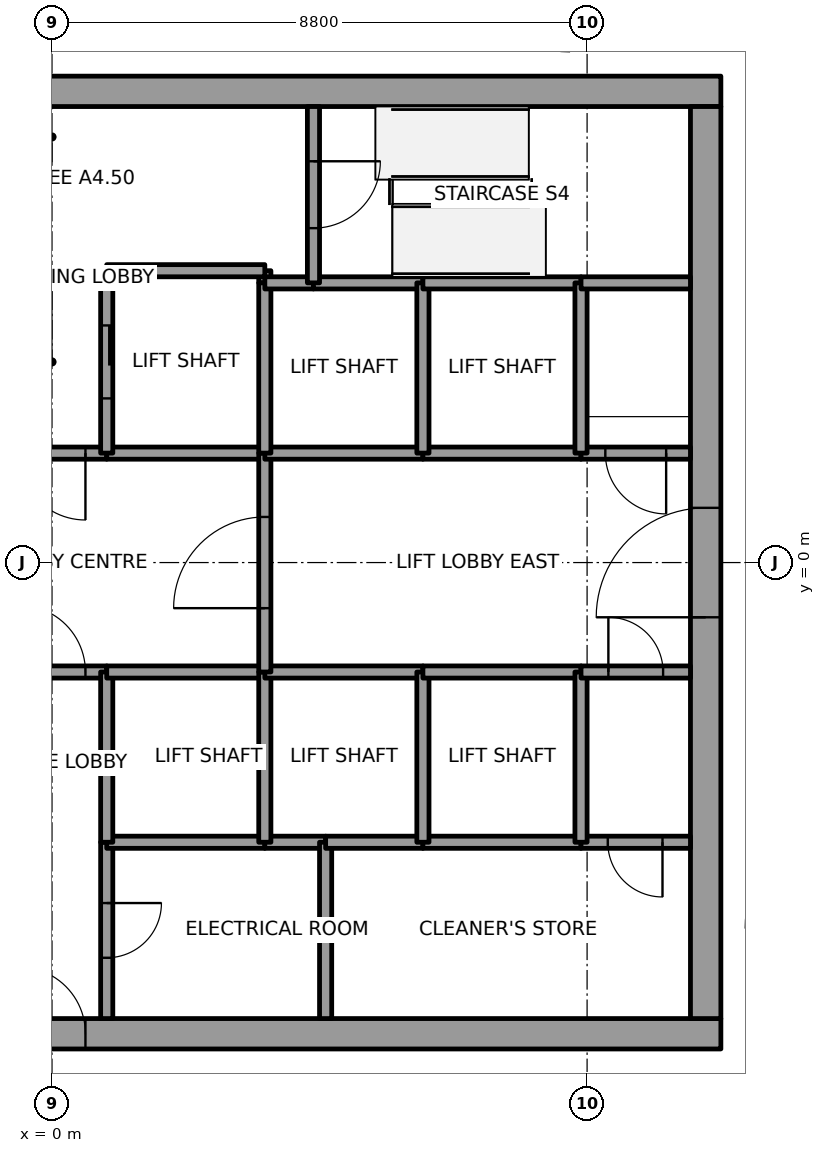
"""IFC4 building model, lengths in metres.
Left out: names, types, materials, properties, quantities, classifications, styles, units other than length and angle.
Written with IfcOpenShell. Run it as: python <this file> out.ifc"""

import sys

from ifc_helpers import new_model, si_unit, direction, frame, frame_2d, origin, place, context, subcontext, project, spatial, rectangle, extrude, element, fill, save


model = new_model("IFC4")
c1 = context("Model", 3, precision=1e-05, world=origin(), true_north=direction((0.0, 1.0)))
c2 = subcontext(c1, "Body", "Model", "MODEL_VIEW")
j1 = project(units=[si_unit("LENGTHUNIT", "METRE"), si_unit("PLANEANGLEUNIT", "RADIAN")], contexts=[c1])
p1 = place(None, origin())
s1 = spatial("IfcSite", under=j1, at=p1, CompositionType="ELEMENT")
p2 = place(p1, origin())
s2 = spatial("IfcBuilding", under=s1, at=p2, CompositionType="ELEMENT")
p3 = place(p2, frame((0.0, 0.0, 213.8)))
s3 = spatial("IfcBuildingStorey", under=s2, at=p3, CompositionType="ELEMENT", Elevation=213.8)
p4 = place(p3, frame((-11.0, -7.75, 0.0), z_axis=(0.0, 0.0, 1.0), x_axis=(1.0, 0.0, 0.0)))
e1 = element("IfcWall", 1, at=p4, inside=s3, PredefinedType="SHEAR", context=c2, shape_type="SweptSolid", body=[
    extrude(rectangle(XDim=22.0, YDim=0.5, at=frame_2d((11.0, 0.0))), origin(), (0.0, 0.0, 1.0), 6.0),
])
p5 = place(p4, frame((10.45, 0.0, 0.0)))
e2 = element("IfcOpeningElement", 2, at=p5, cuts=e1, PredefinedType="OPENING", context=c2, shape_type="SweptSolid", body=[
    extrude(rectangle(XDim=1.1, YDim=2.1, at=frame_2d((0.55, 1.05))), frame((0.0, 0.25, 0.0), z_axis=(0.0, -1.0, 0.0), x_axis=(1.0, 0.0, 0.0)), (0.0, 0.0, 1.0), 0.5),
])
p6 = place(p3, frame((-11.0, 7.75, 0.0), z_axis=(0.0, 0.0, 1.0), x_axis=(1.0, 0.0, 0.0)))
e3 = element("IfcWall", 3, at=p6, inside=s3, PredefinedType="SHEAR", context=c2, shape_type="SweptSolid", body=[
    extrude(rectangle(XDim=22.0, YDim=0.5, at=frame_2d((11.0, 0.0))), origin(), (0.0, 0.0, 1.0), 6.0),
])
p7 = place(p6, frame((8.55, 0.0, 0.0)))
e4 = element("IfcOpeningElement", 4, at=p7, cuts=e3, PredefinedType="OPENING", context=c2, shape_type="SweptSolid", body=[
    extrude(rectangle(XDim=1.1, YDim=2.1, at=frame_2d((0.55, 1.05))), frame((0.0, 0.25, 0.0), z_axis=(0.0, -1.0, 0.0), x_axis=(1.0, 0.0, 0.0)), (0.0, 0.0, 1.0), 0.5),
])
p8 = place(p3, frame((10.75, -7.5, 0.0), z_axis=(0.0, 0.0, 1.0), x_axis=(0.0, 1.0, 0.0)))
e5 = element("IfcWall", 5, at=p8, inside=s3, PredefinedType="SHEAR", context=c2, shape_type="SweptSolid", body=[
    extrude(rectangle(XDim=15.0, YDim=0.5, at=frame_2d((7.5, 0.0))), origin(), (0.0, 0.0, 1.0), 6.0),
])
p9 = place(p8, frame((6.6, 0.0, 0.0)))
e6 = element("IfcOpeningElement", 6, at=p9, cuts=e5, PredefinedType="OPENING", context=c2, shape_type="SweptSolid", body=[
    extrude(rectangle(XDim=1.8, YDim=2.1, at=frame_2d((0.9, 1.05))), frame((0.0, 0.25, 0.0), z_axis=(0.0, -1.0, 0.0), x_axis=(1.0, 0.0, 0.0)), (0.0, 0.0, 1.0), 0.5),
])
p10 = place(p3, frame((-0.9, -1.8, 0.0), z_axis=(0.0, 0.0, 1.0), x_axis=(1.0, 0.0, 0.0)))
e7 = element("IfcWall", 7, at=p10, inside=s3, PredefinedType="SOLIDWALL", context=c2, shape_type="SweptSolid", body=[
    extrude(rectangle(XDim=1.8, YDim=0.2, at=frame_2d((0.9, 0.0))), origin(), (0.0, 0.0, 1.0), 5.85),
])
p11 = place(p10, frame((0.35, 0.0, 0.0)))
e8 = element("IfcOpeningElement", 8, at=p11, cuts=e7, PredefinedType="OPENING", context=c2, shape_type="SweptSolid", body=[
    extrude(rectangle(XDim=1.1, YDim=2.1, at=frame_2d((0.55, 1.05))), frame((0.0, 0.1, 0.0), z_axis=(0.0, -1.0, 0.0), x_axis=(1.0, 0.0, 0.0)), (0.0, 0.0, 1.0), 0.2),
])
p12 = place(p3, frame((0.9, 1.8, 0.0), z_axis=(0.0, 0.0, 1.0), x_axis=(-1.0, 0.0, 0.0)))
e9 = element("IfcWall", 9, at=p12, inside=s3, PredefinedType="SOLIDWALL", context=c2, shape_type="SweptSolid", body=[
    extrude(rectangle(XDim=1.8, YDim=0.2, at=frame_2d((0.9, 0.0))), origin(), (0.0, 0.0, 1.0), 5.85),
])
p13 = place(p12, frame((0.35, 0.0, 0.0)))
e10 = element("IfcOpeningElement", 10, at=p13, cuts=e9, PredefinedType="OPENING", context=c2, shape_type="SweptSolid", body=[
    extrude(rectangle(XDim=1.1, YDim=2.1, at=frame_2d((0.55, 1.05))), frame((0.0, 0.1, 0.0), z_axis=(0.0, -1.0, 0.0), x_axis=(1.0, 0.0, 0.0)), (0.0, 0.0, 1.0), 0.2),
])
p14 = place(p3, frame((0.9, -4.6, 0.0), z_axis=(0.0, 0.0, 1.0), x_axis=(0.0, -1.0, 0.0)))
e11 = element("IfcWall", 11, at=p14, inside=s3, PredefinedType="SOLIDWALL", context=c2, shape_type="SweptSolid", body=[
    extrude(rectangle(XDim=2.9, YDim=0.2, at=frame_2d((1.45, 0.0))), origin(), (0.0, 0.0, 1.0), 5.85),
])
p15 = place(p14, frame((1.0, 0.0, 0.0)))
e12 = element("IfcOpeningElement", 12, at=p15, cuts=e11, PredefinedType="OPENING", context=c2, shape_type="SweptSolid", body=[
    extrude(rectangle(XDim=0.9, YDim=2.1, at=frame_2d((0.45, 1.05))), frame((0.0, 0.1, 0.0), z_axis=(0.0, -1.0, 0.0), x_axis=(1.0, 0.0, 0.0)), (0.0, 0.0, 1.0), 0.2),
])
p16 = place(p3, frame((3.5, -4.6, 0.0), z_axis=(0.0, 0.0, 1.0), x_axis=(-1.0, 0.0, 0.0)))
e13 = element("IfcWall", 13, at=p16, inside=s3, PredefinedType="SOLIDWALL", context=c2, shape_type="SweptSolid", body=[
    extrude(rectangle(XDim=2.6, YDim=0.2, at=frame_2d((1.3, 0.0))), origin(), (0.0, 0.0, 1.0), 5.85),
])
p17 = place(p3, frame((0.9, -1.8, 0.0), z_axis=(0.0, 0.0, 1.0), x_axis=(0.0, -1.0, 0.0)))
e14 = element("IfcWall", 14, at=p17, inside=s3, PredefinedType="SOLIDWALL", context=c2, shape_type="SweptSolid", body=[
    extrude(rectangle(XDim=2.8, YDim=0.2, at=frame_2d((1.4, 0.0))), origin(), (0.0, 0.0, 1.0), 5.85),
])
for number, where, z_axis, x_axis in (
    (15, (0.9, -1.8, 0.0), (0.0, 0.0, 1.0), (1.0, 0.0, 0.0)),
    (16, (3.5, 1.8, 0.0), (0.0, 0.0, 1.0), (-1.0, 0.0, 0.0)),
):
    element("IfcWall", number, at=place(p3, frame(where, z_axis=z_axis, x_axis=x_axis)), inside=s3, PredefinedType="SOLIDWALL", context=c2, shape_type="SweptSolid", body=[
        extrude(rectangle(XDim=2.6, YDim=0.2, at=frame_2d((1.3, 0.0))), origin(), (0.0, 0.0, 1.0), 5.85),
    ])
p18 = place(p3, frame((3.5, 4.6, 0.0), z_axis=(0.0, 0.0, 1.0), x_axis=(0.0, 1.0, 0.0)))
e17 = element("IfcWall", 17, at=p18, inside=s3, PredefinedType="SOLIDWALL", context=c2, shape_type="SweptSolid", body=[
    extrude(rectangle(XDim=0.2, YDim=0.2, at=frame_2d((0.1, 0.0))), origin(), (0.0, 0.0, 1.0), 5.85),
])
p19 = place(p3, frame((3.5, 4.8, 0.0), z_axis=(0.0, 0.0, 1.0), x_axis=(-1.0, 0.0, 0.0)))
e18 = element("IfcWall", 18, at=p19, inside=s3, PredefinedType="SOLIDWALL", context=c2, shape_type="SweptSolid", body=[
    extrude(rectangle(XDim=2.6, YDim=0.2, at=frame_2d((1.3, 0.0))), origin(), (0.0, 0.0, 1.0), 5.85),
])
p20 = place(p3, frame((0.9, 4.8, 0.0), z_axis=(0.0, 0.0, 1.0), x_axis=(0.0, -1.0, 0.0)))
e19 = element("IfcWall", 19, at=p20, inside=s3, PredefinedType="SOLIDWALL", context=c2, shape_type="SweptSolid", body=[
    extrude(rectangle(XDim=3.0, YDim=0.2, at=frame_2d((1.5, 0.0))), origin(), (0.0, 0.0, 1.0), 5.85),
])
p21 = place(p20, frame((0.9, 0.0, 0.0)))
e20 = element("IfcOpeningElement", 20, at=p21, cuts=e19, PredefinedType="OPENING", context=c2, shape_type="SweptSolid", body=[
    extrude(rectangle(XDim=1.2, YDim=2.1, at=frame_2d((0.6, 1.05))), frame((0.0, 0.1, 0.0), z_axis=(0.0, -1.0, 0.0), x_axis=(1.0, 0.0, 0.0)), (0.0, 0.0, 1.0), 0.2),
])
p22 = place(p3, frame((4.5, -4.6, 0.0), z_axis=(0.0, 0.0, 1.0), x_axis=(-1.0, 0.0, 0.0)))
e21 = element("IfcWall", 21, at=p22, inside=s3, PredefinedType="SOLIDWALL", context=c2, shape_type="SweptSolid", body=[
    extrude(rectangle(XDim=1.0, YDim=0.2, at=frame_2d((0.5, 0.0))), origin(), (0.0, 0.0, 1.0), 5.85),
])
p23 = place(p3, frame((3.5, -4.6, 0.0), z_axis=(0.0, 0.0, 1.0), x_axis=(0.0, 1.0, 0.0)))
e22 = element("IfcWall", 22, at=p23, inside=s3, PredefinedType="SOLIDWALL", context=c2, shape_type="SweptSolid", body=[
    extrude(rectangle(XDim=2.8, YDim=0.2, at=frame_2d((1.4, 0.0))), origin(), (0.0, 0.0, 1.0), 5.85),
])
p24 = place(p3, frame((3.5, -1.8, 0.0), z_axis=(0.0, 0.0, 1.0), x_axis=(1.0, 0.0, 0.0)))
e23 = element("IfcWall", 23, at=p24, inside=s3, PredefinedType="SOLIDWALL", context=c2, shape_type="SweptSolid", body=[
    extrude(rectangle(XDim=2.6, YDim=0.2, at=frame_2d((1.3, 0.0))), origin(), (0.0, 0.0, 1.0), 5.85),
])
p25 = place(p3, frame((3.5, -1.8, 0.0), z_axis=(0.0, 0.0, 1.0), x_axis=(0.0, 1.0, 0.0)))
e24 = element("IfcWall", 24, at=p25, inside=s3, PredefinedType="SOLIDWALL", context=c2, shape_type="SweptSolid", body=[
    extrude(rectangle(XDim=3.6, YDim=0.2, at=frame_2d((1.8, 0.0))), origin(), (0.0, 0.0, 1.0), 5.85),
])
p26 = place(p25, frame((1.05, 0.0, 0.0)))
e25 = element("IfcOpeningElement", 25, at=p26, cuts=e24, PredefinedType="OPENING", context=c2, shape_type="SweptSolid", body=[
    extrude(rectangle(XDim=1.5, YDim=2.1, at=frame_2d((0.75, 1.05))), frame((0.0, 0.1, 0.0), z_axis=(0.0, -1.0, 0.0), x_axis=(1.0, 0.0, 0.0)), (0.0, 0.0, 1.0), 0.2),
])
p27 = place(p3, frame((6.1, 1.8, 0.0), z_axis=(0.0, 0.0, 1.0), x_axis=(-1.0, 0.0, 0.0)))
e26 = element("IfcWall", 26, at=p27, inside=s3, PredefinedType="SOLIDWALL", context=c2, shape_type="SweptSolid", body=[
    extrude(rectangle(XDim=2.6, YDim=0.2, at=frame_2d((1.3, 0.0))), origin(), (0.0, 0.0, 1.0), 5.85),
])
p28 = place(p3, frame((3.5, 1.8, 0.0), z_axis=(0.0, 0.0, 1.0), x_axis=(0.0, 1.0, 0.0)))
e27 = element("IfcWall", 27, at=p28, inside=s3, PredefinedType="SOLIDWALL", context=c2, shape_type="SweptSolid", body=[
    extrude(rectangle(XDim=2.8, YDim=0.2, at=frame_2d((1.4, 0.0))), origin(), (0.0, 0.0, 1.0), 5.85),
])
p29 = place(p3, frame((4.3, 4.6, 0.0), z_axis=(0.0, 0.0, 1.0), x_axis=(-1.0, 0.0, 0.0)))
e28 = element("IfcWall", 28, at=p29, inside=s3, PredefinedType="SOLIDWALL", context=c2, shape_type="SweptSolid", body=[
    extrude(rectangle(XDim=0.8, YDim=0.2, at=frame_2d((0.4, 0.0))), origin(), (0.0, 0.0, 1.0), 5.85),
])
p30 = place(p3, frame((6.1, 4.6, 0.0), z_axis=(0.0, 0.0, 1.0), x_axis=(-1.0, 0.0, 0.0)))
e29 = element("IfcWall", 29, at=p30, inside=s3, PredefinedType="SOLIDWALL", context=c2, shape_type="SweptSolid", body=[
    extrude(rectangle(XDim=1.8, YDim=0.2, at=frame_2d((0.9, 0.0))), origin(), (0.0, 0.0, 1.0), 5.85),
])
p31 = place(p3, frame((4.3, 7.5, 0.0), z_axis=(0.0, 0.0, 1.0), x_axis=(0.0, -1.0, 0.0)))
e30 = element("IfcWall", 30, at=p31, inside=s3, PredefinedType="SOLIDWALL", context=c2, shape_type="SweptSolid", body=[
    extrude(rectangle(XDim=2.9, YDim=0.2, at=frame_2d((1.45, 0.0))), origin(), (0.0, 0.0, 1.0), 5.85),
])
p32 = place(p31, frame((0.9, 0.0, 0.0)))
e31 = element("IfcOpeningElement", 31, at=p32, cuts=e30, PredefinedType="OPENING", context=c2, shape_type="SweptSolid", body=[
    extrude(rectangle(XDim=1.1, YDim=2.1, at=frame_2d((0.55, 1.05))), frame((0.0, 0.1, 0.0), z_axis=(0.0, -1.0, 0.0), x_axis=(1.0, 0.0, 0.0)), (0.0, 0.0, 1.0), 0.2),
])
p33 = place(p3, frame((4.5, -4.6, 0.0), z_axis=(0.0, 0.0, 1.0), x_axis=(0.0, -1.0, 0.0)))
e32 = element("IfcWall", 32, at=p33, inside=s3, PredefinedType="SOLIDWALL", context=c2, shape_type="SweptSolid", body=[
    extrude(rectangle(XDim=2.9, YDim=0.2, at=frame_2d((1.45, 0.0))), origin(), (0.0, 0.0, 1.0), 5.85),
])
p34 = place(p3, frame((6.1, -4.6, 0.0), z_axis=(0.0, 0.0, 1.0), x_axis=(-1.0, 0.0, 0.0)))
e33 = element("IfcWall", 33, at=p34, inside=s3, PredefinedType="SOLIDWALL", context=c2, shape_type="SweptSolid", body=[
    extrude(rectangle(XDim=1.6, YDim=0.2, at=frame_2d((0.8, 0.0))), origin(), (0.0, 0.0, 1.0), 5.85),
])
p35 = place(p3, frame((8.7, -4.6, 0.0), z_axis=(0.0, 0.0, 1.0), x_axis=(-1.0, 0.0, 0.0)))
e34 = element("IfcWall", 34, at=p35, inside=s3, PredefinedType="SOLIDWALL", context=c2, shape_type="SweptSolid", body=[
    extrude(rectangle(XDim=2.6, YDim=0.2, at=frame_2d((1.3, 0.0))), origin(), (0.0, 0.0, 1.0), 5.85),
])
p36 = place(p3, frame((6.1, -4.6, 0.0), z_axis=(0.0, 0.0, 1.0), x_axis=(0.0, 1.0, 0.0)))
e35 = element("IfcWall", 35, at=p36, inside=s3, PredefinedType="SOLIDWALL", context=c2, shape_type="SweptSolid", body=[
    extrude(rectangle(XDim=2.8, YDim=0.2, at=frame_2d((1.4, 0.0))), origin(), (0.0, 0.0, 1.0), 5.85),
])
for number, where, z_axis, x_axis in (
    (36, (6.1, -1.8, 0.0), (0.0, 0.0, 1.0), (1.0, 0.0, 0.0)),
    (37, (8.7, 1.8, 0.0), (0.0, 0.0, 1.0), (-1.0, 0.0, 0.0)),
):
    element("IfcWall", number, at=place(p3, frame(where, z_axis=z_axis, x_axis=x_axis)), inside=s3, PredefinedType="SOLIDWALL", context=c2, shape_type="SweptSolid", body=[
        extrude(rectangle(XDim=2.6, YDim=0.2, at=frame_2d((1.3, 0.0))), origin(), (0.0, 0.0, 1.0), 5.85),
    ])
p37 = place(p3, frame((6.1, 1.8, 0.0), z_axis=(0.0, 0.0, 1.0), x_axis=(0.0, 1.0, 0.0)))
e38 = element("IfcWall", 38, at=p37, inside=s3, PredefinedType="SOLIDWALL", context=c2, shape_type="SweptSolid", body=[
    extrude(rectangle(XDim=2.8, YDim=0.2, at=frame_2d((1.4, 0.0))), origin(), (0.0, 0.0, 1.0), 5.85),
])
p38 = place(p3, frame((8.7, 4.6, 0.0), z_axis=(0.0, 0.0, 1.0), x_axis=(-1.0, 0.0, 0.0)))
e39 = element("IfcWall", 39, at=p38, inside=s3, PredefinedType="SOLIDWALL", context=c2, shape_type="SweptSolid", body=[
    extrude(rectangle(XDim=2.6, YDim=0.2, at=frame_2d((1.3, 0.0))), origin(), (0.0, 0.0, 1.0), 5.85),
])
p39 = place(p3, frame((10.5, -4.6, 0.0), z_axis=(0.0, 0.0, 1.0), x_axis=(-1.0, 0.0, 0.0)))
e40 = element("IfcWall", 40, at=p39, inside=s3, PredefinedType="SOLIDWALL", context=c2, shape_type="SweptSolid", body=[
    extrude(rectangle(XDim=1.8, YDim=0.2, at=frame_2d((0.9, 0.0))), origin(), (0.0, 0.0, 1.0), 5.85),
])
p40 = place(p39, frame((0.46, 0.0, 0.0)))
e41 = element("IfcOpeningElement", 41, at=p40, cuts=e40, PredefinedType="OPENING", context=c2, shape_type="SweptSolid", body=[
    extrude(rectangle(XDim=0.9, YDim=2.1, at=frame_2d((0.45, 1.05))), frame((0.0, 0.1, 0.0), z_axis=(0.0, -1.0, 0.0), x_axis=(1.0, 0.0, 0.0)), (0.0, 0.0, 1.0), 0.2),
])
p41 = place(p3, frame((8.7, -1.8, 0.0), z_axis=(0.0, 0.0, 1.0), x_axis=(0.0, -1.0, 0.0)))
e42 = element("IfcWall", 42, at=p41, inside=s3, PredefinedType="SOLIDWALL", context=c2, shape_type="SweptSolid", body=[
    extrude(rectangle(XDim=2.8, YDim=0.2, at=frame_2d((1.4, 0.0))), origin(), (0.0, 0.0, 1.0), 5.85),
])
p42 = place(p3, frame((8.7, -1.8, 0.0), z_axis=(0.0, 0.0, 1.0), x_axis=(1.0, 0.0, 0.0)))
e43 = element("IfcWall", 43, at=p42, inside=s3, PredefinedType="SOLIDWALL", context=c2, shape_type="SweptSolid", body=[
    extrude(rectangle(XDim=1.8, YDim=0.2, at=frame_2d((0.9, 0.0))), origin(), (0.0, 0.0, 1.0), 5.85),
])
p43 = place(p42, frame((0.45, 0.0, 0.0)))
e44 = element("IfcOpeningElement", 44, at=p43, cuts=e43, PredefinedType="OPENING", context=c2, shape_type="SweptSolid", body=[
    extrude(rectangle(XDim=0.9, YDim=2.1, at=frame_2d((0.45, 1.05))), frame((0.0, 0.1, 0.0), z_axis=(0.0, -1.0, 0.0), x_axis=(1.0, 0.0, 0.0)), (0.0, 0.0, 1.0), 0.2),
])
p44 = place(p3, frame((10.5, 1.8, 0.0), z_axis=(0.0, 0.0, 1.0), x_axis=(-1.0, 0.0, 0.0)))
e45 = element("IfcWall", 45, at=p44, inside=s3, PredefinedType="SOLIDWALL", context=c2, shape_type="SweptSolid", body=[
    extrude(rectangle(XDim=1.8, YDim=0.2, at=frame_2d((0.9, 0.0))), origin(), (0.0, 0.0, 1.0), 5.85),
])
p45 = place(p44, frame((0.4, 0.0, 0.0)))
e46 = element("IfcOpeningElement", 46, at=p45, cuts=e45, PredefinedType="OPENING", context=c2, shape_type="SweptSolid", body=[
    extrude(rectangle(XDim=1.0, YDim=2.1, at=frame_2d((0.5, 1.05))), frame((0.0, 0.1, 0.0), z_axis=(0.0, -1.0, 0.0), x_axis=(1.0, 0.0, 0.0)), (0.0, 0.0, 1.0), 0.2),
])
p46 = place(p3, frame((8.7, 4.6, 0.0), z_axis=(0.0, 0.0, 1.0), x_axis=(0.0, -1.0, 0.0)))
e47 = element("IfcWall", 47, at=p46, inside=s3, PredefinedType="SOLIDWALL", context=c2, shape_type="SweptSolid", body=[
    extrude(rectangle(XDim=2.8, YDim=0.2, at=frame_2d((1.4, 0.0))), origin(), (0.0, 0.0, 1.0), 5.85),
])
p47 = place(p3, frame((10.5, 4.6, 0.0), z_axis=(0.0, 0.0, 1.0), x_axis=(-1.0, 0.0, 0.0)))
e48 = element("IfcWall", 48, at=p47, inside=s3, PredefinedType="SOLIDWALL", context=c2, shape_type="SweptSolid", body=[
    extrude(rectangle(XDim=1.8, YDim=0.2, at=frame_2d((0.9, 0.0))), origin(), (0.0, 0.0, 1.0), 5.85),
])
p48 = place(p21, origin())
e49 = element("IfcDoor", 49, at=p48, inside=s3, OperationType="SLIDING_TO_RIGHT", PredefinedType="DOOR", context=c2, shape_type="SweptSolid", body=[
    extrude(rectangle(XDim=1.2, YDim=2.1, at=frame_2d((0.6, 1.05))), frame((0.0, 0.025, 0.0), z_axis=(0.0, -1.0, 0.0), x_axis=(1.0, 0.0, 0.0)), (0.0, 0.0, 1.0), 0.05),
])
fill(e20, e49)
p49 = place(p26, origin())
e50 = element("IfcDoor", 50, at=p49, inside=s3, OperationType="DOUBLE_DOOR_SINGLE_SWING", PredefinedType="DOOR", context=c2, shape_type="SweptSolid", body=[
    extrude(rectangle(XDim=1.5, YDim=2.1, at=frame_2d((0.75, 1.05))), frame((0.0, 0.025, 0.0), z_axis=(0.0, -1.0, 0.0), x_axis=(1.0, 0.0, 0.0)), (0.0, 0.0, 1.0), 0.05),
])
fill(e25, e50)
p50 = place(p13, origin())
e51 = element("IfcDoor", 51, at=p50, inside=s3, OperationType="SINGLE_SWING_LEFT", PredefinedType="DOOR", context=c2, shape_type="SweptSolid", body=[
    extrude(rectangle(XDim=1.1, YDim=2.1, at=frame_2d((0.55, 1.05))), frame((0.0, 0.025, 0.0), z_axis=(0.0, -1.0, 0.0), x_axis=(1.0, 0.0, 0.0)), (0.0, 0.0, 1.0), 0.05),
])
fill(e10, e51)
p51 = place(p11, origin())
e52 = element("IfcDoor", 52, at=p51, inside=s3, OperationType="SINGLE_SWING_RIGHT", PredefinedType="DOOR", context=c2, shape_type="SweptSolid", body=[
    extrude(rectangle(XDim=1.1, YDim=2.1, at=frame_2d((0.55, 1.05))), frame((0.0, 0.025, 0.0), z_axis=(0.0, -1.0, 0.0), x_axis=(1.0, 0.0, 0.0)), (0.0, 0.0, 1.0), 0.05),
])
fill(e8, e52)
p52 = place(p45, origin())
e53 = element("IfcDoor", 53, at=p52, inside=s3, OperationType="SINGLE_SWING_LEFT", PredefinedType="DOOR", context=c2, shape_type="SweptSolid", body=[
    extrude(rectangle(XDim=1.0, YDim=2.1, at=frame_2d((0.5, 1.05))), frame((0.0, 0.025, 0.0), z_axis=(0.0, -1.0, 0.0), x_axis=(1.0, 0.0, 0.0)), (0.0, 0.0, 1.0), 0.05),
])
fill(e46, e53)
p53 = place(p32, origin())
e54 = element("IfcDoor", 54, at=p53, inside=s3, OperationType="SINGLE_SWING_LEFT", PredefinedType="DOOR", context=c2, shape_type="SweptSolid", body=[
    extrude(rectangle(XDim=1.1, YDim=2.1, at=frame_2d((0.55, 1.05))), frame((0.0, 0.025, 0.0), z_axis=(0.0, -1.0, 0.0), x_axis=(1.0, 0.0, 0.0)), (0.0, 0.0, 1.0), 0.05),
])
fill(e31, e54)
p54 = place(p40, origin())
e55 = element("IfcDoor", 55, at=p54, inside=s3, OperationType="SINGLE_SWING_RIGHT", PredefinedType="DOOR", context=c2, shape_type="SweptSolid", body=[
    extrude(rectangle(XDim=0.9, YDim=2.1, at=frame_2d((0.45, 1.05))), frame((0.0, 0.025, 0.0), z_axis=(0.0, -1.0, 0.0), x_axis=(1.0, 0.0, 0.0)), (0.0, 0.0, 1.0), 0.05),
])
fill(e41, e55)
p55 = place(p43, origin())
e56 = element("IfcDoor", 56, at=p55, inside=s3, OperationType="SINGLE_SWING_RIGHT", PredefinedType="DOOR", context=c2, shape_type="SweptSolid", body=[
    extrude(rectangle(XDim=0.9, YDim=2.1, at=frame_2d((0.45, 1.05))), frame((0.0, 0.025, 0.0), z_axis=(0.0, -1.0, 0.0), x_axis=(1.0, 0.0, 0.0)), (0.0, 0.0, 1.0), 0.05),
])
fill(e44, e56)
p56 = place(p15, origin())
e57 = element("IfcDoor", 57, at=p56, inside=s3, OperationType="SINGLE_SWING_RIGHT", PredefinedType="DOOR", context=c2, shape_type="SweptSolid", body=[
    extrude(rectangle(XDim=0.9, YDim=2.1, at=frame_2d((0.45, 1.05))), frame((0.0, 0.025, 0.0), z_axis=(0.0, -1.0, 0.0), x_axis=(1.0, 0.0, 0.0)), (0.0, 0.0, 1.0), 0.05),
])
fill(e12, e57)
p57 = place(p9, origin())
e58 = element("IfcDoor", 58, at=p57, inside=s3, OperationType="DOUBLE_DOOR_SINGLE_SWING", PredefinedType="DOOR", context=c2, shape_type="SweptSolid", body=[
    extrude(rectangle(XDim=1.8, YDim=2.1, at=frame_2d((0.9, 1.05))), frame((0.0, 0.025, 0.0), z_axis=(0.0, -1.0, 0.0), x_axis=(1.0, 0.0, 0.0)), (0.0, 0.0, 1.0), 0.05),
])
fill(e6, e58)
p58 = place(p5, origin())
e59 = element("IfcDoor", 59, at=p58, inside=s3, OperationType="SINGLE_SWING_LEFT", PredefinedType="DOOR", context=c2, shape_type="SweptSolid", body=[
    extrude(rectangle(XDim=1.1, YDim=2.1, at=frame_2d((0.55, 1.05))), frame((0.0, 0.025, 0.0), z_axis=(0.0, -1.0, 0.0), x_axis=(1.0, 0.0, 0.0)), (0.0, 0.0, 1.0), 0.05),
])
fill(e2, e59)
save(model, sys.argv[1])
